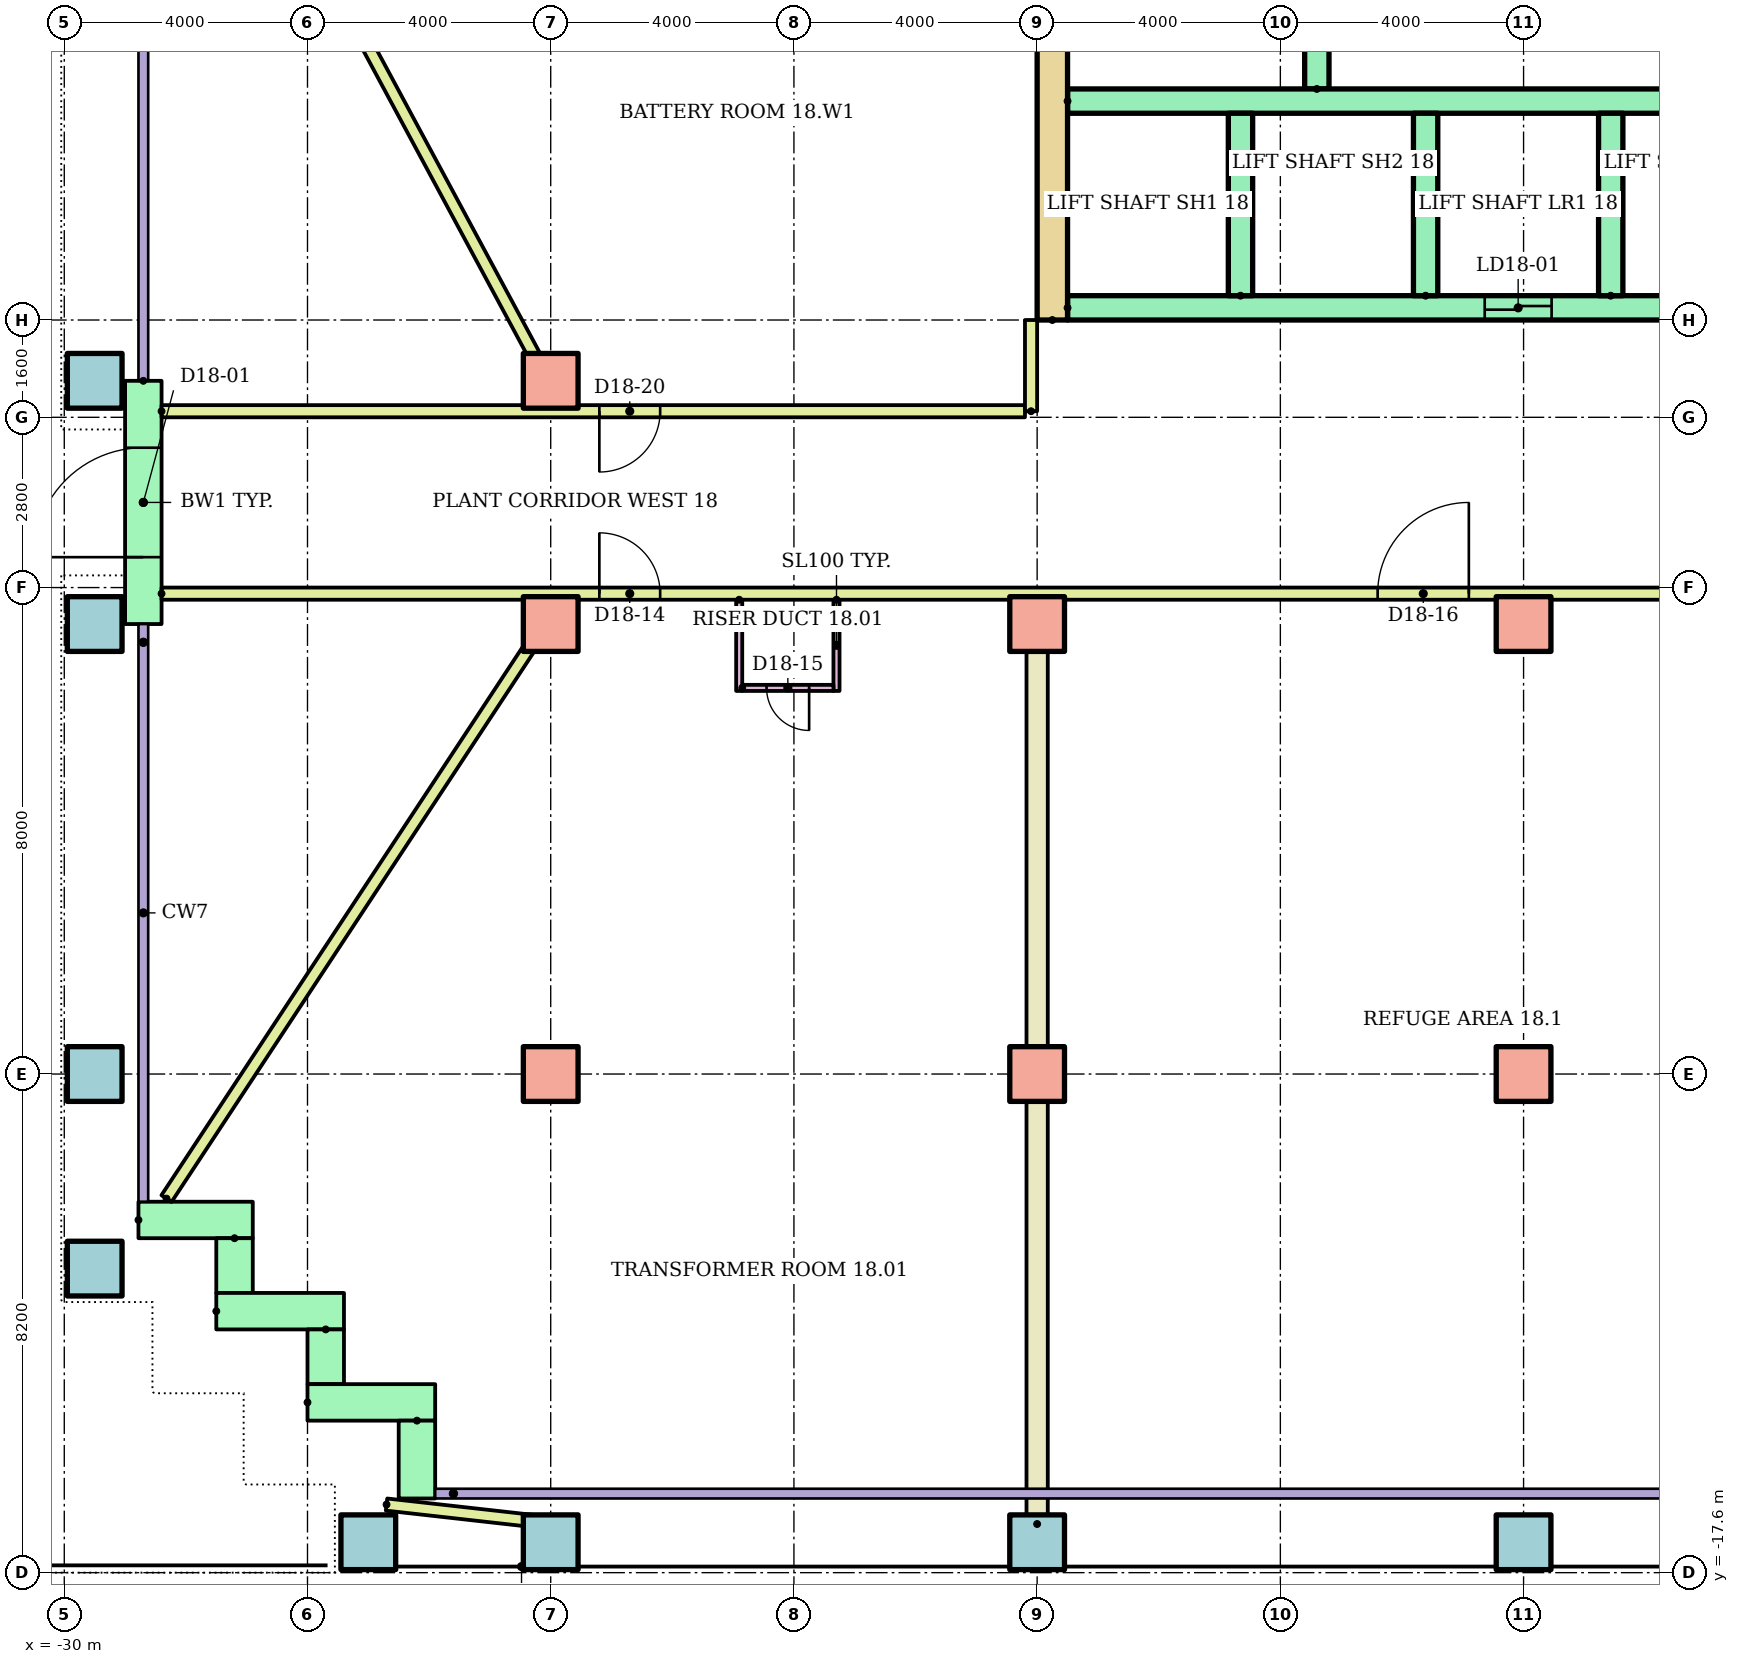
"""IFC4 building model, lengths in metres.
Left out: names, types, materials, properties, quantities, classifications, styles, units other than length and angle.
Written with IfcOpenShell. Run it as: python <this file> out.ifc"""

import sys

from ifc_helpers import new_model, si_unit, direction, frame, frame_2d, origin, origin_2d, place, context, subcontext, project, spatial, rectangle, hollow_rectangle, extrude, element, fill, save


model = new_model("IFC4")
c1 = context("Model", 3, precision=1e-05, world=origin(), true_north=direction((0.0, 1.0)))
c2 = subcontext(c1, "Body", "Model", "MODEL_VIEW")
j1 = project(units=[si_unit("LENGTHUNIT", "METRE"), si_unit("PLANEANGLEUNIT", "RADIAN")], contexts=[c1])
p1 = place(None, origin())
s1 = spatial("IfcSite", under=j1, at=p1, CompositionType="ELEMENT")
p2 = place(p1, origin())
s2 = spatial("IfcBuilding", under=s1, at=p2, CompositionType="ELEMENT")
p3 = place(p2, frame((0.0, 0.0, 73.6)))
s3 = spatial("IfcBuildingStorey", under=s2, at=p3, CompositionType="ELEMENT", Elevation=73.6)
for number, where in (
    (1, (-25.0, -17.1, 0.0)),
    (2, (-22.0, -17.1, 0.0)),
    (3, (-14.0, -17.1, 0.0)),
    (4, (-6.0, -17.1, 0.0)),
    (5, (-29.5, -12.6, 0.0)),
    (6, (-29.5, -9.4, 0.0)),
):
    element("IfcColumn", number, at=place(p3, frame(where)), inside=s3, PredefinedType="COLUMN", context=c2, shape_type="SweptSolid", body=[
        extrude(hollow_rectangle(XDim=0.9, YDim=0.9, WallThickness=0.045, at=origin_2d()), origin(), (0.0, 0.0, 1.0), 3.9),
    ])
for number, where in (
    (7, (-22.0, -9.4, 0.0)),
    (8, (-14.0, -9.4, 0.0)),
    (9, (-6.0, -9.4, 0.0)),
):
    element("IfcColumn", number, at=place(p3, frame(where)), inside=s3, PredefinedType="COLUMN", context=c2, shape_type="SweptSolid", body=[
        extrude(rectangle(XDim=0.9, YDim=0.9, at=origin_2d()), origin(), (0.0, 0.0, 1.0), 3.9),
    ])
p4 = place(p3, frame((-29.5, -2.0, 0.0)))
e10 = element("IfcColumn", 10, at=p4, inside=s3, PredefinedType="COLUMN", context=c2, shape_type="SweptSolid", body=[
    extrude(hollow_rectangle(XDim=0.9, YDim=0.9, WallThickness=0.045, at=origin_2d()), origin(), (0.0, 0.0, 1.0), 3.9),
])
for number, where in (
    (11, (-22.0, -2.0, 0.0)),
    (12, (-14.0, -2.0, 0.0)),
    (13, (-6.0, -2.0, 0.0)),
):
    element("IfcColumn", number, at=place(p3, frame(where)), inside=s3, PredefinedType="COLUMN", context=c2, shape_type="SweptSolid", body=[
        extrude(rectangle(XDim=0.9, YDim=0.9, at=origin_2d()), origin(), (0.0, 0.0, 1.0), 3.9),
    ])
p5 = place(p3, frame((-29.5, 2.0, 0.0)))
e14 = element("IfcColumn", 14, at=p5, inside=s3, PredefinedType="COLUMN", context=c2, shape_type="SweptSolid", body=[
    extrude(hollow_rectangle(XDim=0.9, YDim=0.9, WallThickness=0.045, at=origin_2d()), origin(), (0.0, 0.0, 1.0), 3.9),
])
p6 = place(p3, frame((-22.0, 2.0, 0.0)))
e15 = element("IfcColumn", 15, at=p6, inside=s3, PredefinedType="COLUMN", context=c2, shape_type="SweptSolid", body=[
    extrude(rectangle(XDim=0.9, YDim=0.9, at=origin_2d()), origin(), (0.0, 0.0, 1.0), 3.9),
])
p7 = place(p3, frame((-28.7, 2.0, 0.0), z_axis=(0.0, 0.0, 1.0), x_axis=(0.0, -1.0, 0.0)))
e16 = element("IfcWall", 16, at=p7, inside=s3, PredefinedType="STANDARD", context=c2, shape_type="SweptSolid", body=[
    extrude(rectangle(XDim=4.0, YDim=0.6, at=frame_2d((2.0, 0.0))), origin(), (0.0, 0.0, 1.0), 3.62),
])
p8 = place(p7, frame((1.1, 0.0, 0.0)))
e17 = element("IfcOpeningElement", 17, at=p8, cuts=e16, PredefinedType="OPENING", context=c2, shape_type="SweptSolid", body=[
    extrude(rectangle(XDim=1.8, YDim=2.1, at=frame_2d((0.9, 1.05))), frame((0.0, 0.31, 0.0), z_axis=(0.0, -1.0, 0.0), x_axis=(1.0, 0.0, 0.0)), (0.0, 0.0, 1.0), 0.62),
])
p9 = place(p3, frame((-28.78, -11.8, 0.0)))
e18 = element("IfcWall", 18, at=p9, inside=s3, PredefinedType="STANDARD", context=c2, shape_type="SweptSolid", body=[
    extrude(rectangle(XDim=1.88, YDim=0.6, at=frame_2d((0.94, 0.0))), origin(), (0.0, 0.0, 1.0), 3.62),
])
p10 = place(p3, frame((-27.2, -12.1, 0.0), z_axis=(0.0, 0.0, 1.0), x_axis=(0.0, -1.0, 0.0)))
e19 = element("IfcWall", 19, at=p10, inside=s3, PredefinedType="STANDARD", context=c2, shape_type="SweptSolid", body=[
    extrude(rectangle(XDim=0.9, YDim=0.6, at=frame_2d((0.45, 0.0))), origin(), (0.0, 0.0, 1.0), 3.62),
])
p11 = place(p3, frame((-27.5, -13.3, 0.0)))
e20 = element("IfcWall", 20, at=p11, inside=s3, PredefinedType="STANDARD", context=c2, shape_type="SweptSolid", body=[
    extrude(rectangle(XDim=2.1, YDim=0.6, at=frame_2d((1.05, 0.0))), origin(), (0.0, 0.0, 1.0), 3.62),
])
p12 = place(p3, frame((-25.7, -13.6, 0.0), z_axis=(0.0, 0.0, 1.0), x_axis=(0.0, -1.0, 0.0)))
e21 = element("IfcWall", 21, at=p12, inside=s3, PredefinedType="STANDARD", context=c2, shape_type="SweptSolid", body=[
    extrude(rectangle(XDim=0.9, YDim=0.6, at=frame_2d((0.45, 0.0))), origin(), (0.0, 0.0, 1.0), 3.62),
])
p13 = place(p3, frame((-26.0, -14.8, 0.0)))
e22 = element("IfcWall", 22, at=p13, inside=s3, PredefinedType="STANDARD", context=c2, shape_type="SweptSolid", body=[
    extrude(rectangle(XDim=2.1, YDim=0.6, at=frame_2d((1.05, 0.0))), origin(), (0.0, 0.0, 1.0), 3.62),
])
p14 = place(p3, frame((-24.2, -15.1, 0.0), z_axis=(0.0, 0.0, 1.0), x_axis=(0.0, -1.0, 0.0)))
e23 = element("IfcWall", 23, at=p14, inside=s3, PredefinedType="STANDARD", context=c2, shape_type="SweptSolid", body=[
    extrude(rectangle(XDim=1.28, YDim=0.6, at=frame_2d((0.64, 0.0))), origin(), (0.0, 0.0, 1.0), 3.62),
])
p15 = place(p3, frame((-13.75, 3.0, 0.0), z_axis=(0.0, 0.0, 1.0), x_axis=(0.0, 1.0, 0.0)))
e24 = element("IfcWall", 24, at=p15, inside=s3, PredefinedType="SHEAR", context=c2, shape_type="SweptSolid", body=[
    extrude(rectangle(XDim=17.0, YDim=0.5, at=frame_2d((8.5, 0.0))), origin(), (0.0, 0.0, 1.0), 3.62),
])
p16 = place(p3, frame((-9.4, 6.8, 0.0), z_axis=(0.0, 0.0, 1.0), x_axis=(0.0, 1.0, 0.0)))
e25 = element("IfcWall", 25, at=p16, inside=s3, PredefinedType="SHEAR", context=c2, shape_type="SweptSolid", body=[
    extrude(rectangle(XDim=12.7, YDim=0.4, at=frame_2d((6.35, 0.0))), origin(), (0.0, 0.0, 1.0), 3.62),
])
p17 = place(p16, frame((1.15, 0.0, 0.0)))
e26 = element("IfcOpeningElement", 26, at=p17, cuts=e25, PredefinedType="OPENING", context=c2, shape_type="SweptSolid", body=[
    extrude(rectangle(XDim=1.0, YDim=2.1, at=frame_2d((0.5, 1.05))), frame((0.0, 0.21, 0.0), z_axis=(0.0, -1.0, 0.0), x_axis=(1.0, 0.0, 0.0)), (0.0, 0.0, 1.0), 0.42),
])
p18 = place(p16, frame((7.925, 0.0, 0.0)))
e27 = element("IfcOpeningElement", 27, at=p18, cuts=e25, PredefinedType="OPENING", context=c2, shape_type="SweptSolid", body=[
    extrude(rectangle(XDim=1.0, YDim=2.1, at=frame_2d((0.5, 1.05))), frame((0.0, 0.21, 0.0), z_axis=(0.0, -1.0, 0.0), x_axis=(1.0, 0.0, 0.0)), (0.0, 0.0, 1.0), 0.42),
])
p19 = place(p3, frame((-13.5, 3.2, 0.0)))
e28 = element("IfcWall", 28, at=p19, inside=s3, PredefinedType="SHEAR", context=c2, shape_type="SweptSolid", body=[
    extrude(rectangle(XDim=27.0, YDim=0.4, at=frame_2d((13.5, 0.0))), origin(), (0.0, 0.0, 1.0), 3.62),
])
p20 = place(p19, frame((6.861, 0.0, 0.0)))
e29 = element("IfcOpeningElement", 29, at=p20, cuts=e28, PredefinedType="OPENING", context=c2, shape_type="SweptSolid", body=[
    extrude(rectangle(XDim=1.1, YDim=2.1, at=frame_2d((0.55, 1.05))), frame((0.0, 0.21, 0.0), z_axis=(0.0, -1.0, 0.0), x_axis=(1.0, 0.0, 0.0)), (0.0, 0.0, 1.0), 0.42),
])
p21 = place(p19, frame((9.906, 0.0, 0.0)))
e30 = element("IfcOpeningElement", 30, at=p21, cuts=e28, PredefinedType="OPENING", context=c2, shape_type="SweptSolid", body=[
    extrude(rectangle(XDim=1.1, YDim=2.1, at=frame_2d((0.55, 1.05))), frame((0.0, 0.21, 0.0), z_axis=(0.0, -1.0, 0.0), x_axis=(1.0, 0.0, 0.0)), (0.0, 0.0, 1.0), 0.42),
])
p22 = place(p19, frame((15.994, 0.0, 0.0)))
e31 = element("IfcOpeningElement", 31, at=p22, cuts=e28, PredefinedType="OPENING", context=c2, shape_type="SweptSolid", body=[
    extrude(rectangle(XDim=1.1, YDim=2.1, at=frame_2d((0.55, 1.05))), frame((0.0, 0.21, 0.0), z_axis=(0.0, -1.0, 0.0), x_axis=(1.0, 0.0, 0.0)), (0.0, 0.0, 1.0), 0.42),
])
p23 = place(p19, frame((19.039, 0.0, 0.0)))
e32 = element("IfcOpeningElement", 32, at=p23, cuts=e28, PredefinedType="OPENING", context=c2, shape_type="SweptSolid", body=[
    extrude(rectangle(XDim=1.1, YDim=2.1, at=frame_2d((0.55, 1.05))), frame((0.0, 0.21, 0.0), z_axis=(0.0, -1.0, 0.0), x_axis=(1.0, 0.0, 0.0)), (0.0, 0.0, 1.0), 0.42),
])
p24 = place(p19, frame((12.6, 0.0, 0.0)))
e33 = element("IfcOpeningElement", 33, at=p24, cuts=e28, PredefinedType="OPENING", context=c2, shape_type="SweptSolid", body=[
    extrude(rectangle(XDim=1.8, YDim=2.1, at=frame_2d((0.9, 1.05))), frame((0.0, 0.21, 0.0), z_axis=(0.0, -1.0, 0.0), x_axis=(1.0, 0.0, 0.0)), (0.0, 0.0, 1.0), 0.42),
])
p25 = place(p3, frame((-13.5, 6.6, 0.0)))
e34 = element("IfcWall", 34, at=p25, inside=s3, PredefinedType="SHEAR", context=c2, shape_type="SweptSolid", body=[
    extrude(rectangle(XDim=11.978, YDim=0.4, at=frame_2d((5.989, 0.0))), origin(), (0.0, 0.0, 1.0), 3.62),
])
for number, where, z_axis, x_axis in (
    (35, (-10.656, 3.4, 0.0), (0.0, 0.0, 1.0), (0.0, 1.0, 0.0)),
    (36, (-7.611, 3.4, 0.0), (0.0, 0.0, 1.0), (0.0, 1.0, 0.0)),
    (37, (-4.567, 3.4, 0.0), (0.0, 0.0, 1.0), (0.0, 1.0, 0.0)),
):
    element("IfcWall", number, at=place(p3, frame(where, z_axis=z_axis, x_axis=x_axis)), inside=s3, PredefinedType="SHEAR", context=c2, shape_type="SweptSolid", body=[
        extrude(rectangle(XDim=3.0, YDim=0.4, at=frame_2d((1.5, 0.0))), origin(), (0.0, 0.0, 1.0), 3.62),
    ])
p26 = place(p3, frame((-28.4, -1.5, 0.0)))
e38 = element("IfcWall", 38, at=p26, inside=s3, PredefinedType="PARTITIONING", context=c2, shape_type="SweptSolid", body=[
    extrude(rectangle(XDim=69.6, YDim=0.2, at=frame_2d((34.8, 0.0))), origin(), (0.0, 0.0, 1.0), 3.62),
])
p27 = place(p26, frame((7.2, 0.0, 0.0)))
e39 = element("IfcOpeningElement", 39, at=p27, cuts=e38, PredefinedType="OPENING", context=c2, shape_type="SweptSolid", body=[
    extrude(rectangle(XDim=1.0, YDim=2.4, at=frame_2d((0.5, 1.2))), frame((0.0, 0.11, 0.0), z_axis=(0.0, -1.0, 0.0), x_axis=(1.0, 0.0, 0.0)), (0.0, 0.0, 1.0), 0.22),
])
p28 = place(p26, frame((20.0, 0.0, 0.0)))
e40 = element("IfcOpeningElement", 40, at=p28, cuts=e38, PredefinedType="OPENING", context=c2, shape_type="SweptSolid", body=[
    extrude(rectangle(XDim=1.5, YDim=2.1, at=frame_2d((0.75, 1.05))), frame((0.0, 0.11, 0.0), z_axis=(0.0, -1.0, 0.0), x_axis=(1.0, 0.0, 0.0)), (0.0, 0.0, 1.0), 0.22),
])
p29 = place(p26, frame((34.6, 0.0, 0.0)))
e41 = element("IfcOpeningElement", 41, at=p29, cuts=e38, PredefinedType="OPENING", context=c2, shape_type="SweptSolid", body=[
    extrude(rectangle(XDim=1.5, YDim=2.1, at=frame_2d((0.75, 1.05))), frame((0.0, 0.11, 0.0), z_axis=(0.0, -1.0, 0.0), x_axis=(1.0, 0.0, 0.0)), (0.0, 0.0, 1.0), 0.22),
])
p30 = place(p26, frame((49.6, 0.0, 0.0)))
e42 = element("IfcOpeningElement", 42, at=p30, cuts=e38, PredefinedType="OPENING", context=c2, shape_type="SweptSolid", body=[
    extrude(rectangle(XDim=1.6, YDim=2.4, at=frame_2d((0.8, 1.2))), frame((0.0, 0.11, 0.0), z_axis=(0.0, -1.0, 0.0), x_axis=(1.0, 0.0, 0.0)), (0.0, 0.0, 1.0), 0.22),
])
p31 = place(p26, frame((63.2, 0.0, 0.0)))
e43 = element("IfcOpeningElement", 43, at=p31, cuts=e38, PredefinedType="OPENING", context=c2, shape_type="SweptSolid", body=[
    extrude(rectangle(XDim=1.6, YDim=2.4, at=frame_2d((0.8, 1.2))), frame((0.0, 0.11, 0.0), z_axis=(0.0, -1.0, 0.0), x_axis=(1.0, 0.0, 0.0)), (0.0, 0.0, 1.0), 0.22),
])
p32 = place(p3, frame((-28.4, 1.5, 0.0)))
e44 = element("IfcWall", 44, at=p32, inside=s3, PredefinedType="PARTITIONING", context=c2, shape_type="SweptSolid", body=[
    extrude(rectangle(XDim=14.2, YDim=0.2, at=frame_2d((7.1, 0.0))), origin(), (0.0, 0.0, 1.0), 3.62),
])
p33 = place(p32, frame((7.2, 0.0, 0.0)))
e45 = element("IfcOpeningElement", 45, at=p33, cuts=e44, PredefinedType="OPENING", context=c2, shape_type="SweptSolid", body=[
    extrude(rectangle(XDim=1.0, YDim=2.4, at=frame_2d((0.5, 1.2))), frame((0.0, 0.11, 0.0), z_axis=(0.0, -1.0, 0.0), x_axis=(1.0, 0.0, 0.0)), (0.0, 0.0, 1.0), 0.22),
])
p34 = place(p3, frame((-14.1, 1.5, 0.0), z_axis=(0.0, 0.0, 1.0), x_axis=(0.0, 1.0, 0.0)))
e46 = element("IfcWall", 46, at=p34, inside=s3, PredefinedType="PARTITIONING", context=c2, shape_type="SweptSolid", body=[
    extrude(rectangle(XDim=1.5, YDim=0.2, at=frame_2d((0.75, 0.0))), origin(), (0.0, 0.0, 1.0), 3.62),
])
for number, where, z_axis, x_axis in (
    (47, (-18.9, -1.6, 0.0), (0.0, 0.0, 1.0), (0.0, -1.0, 0.0)),
    (48, (-17.3, -1.6, 0.0), (0.0, 0.0, 1.0), (0.0, -1.0, 0.0)),
):
    element("IfcWall", number, at=place(p3, frame(where, z_axis=z_axis, x_axis=x_axis)), inside=s3, PredefinedType="PARTITIONING", context=c2, shape_type="SweptSolid", body=[
        extrude(rectangle(XDim=1.5, YDim=0.1, at=frame_2d((0.75, 0.0))), origin(), (0.0, 0.0, 1.0), 3.62),
    ])
p35 = place(p3, frame((-18.85, -3.05, 0.0)))
e49 = element("IfcWall", 49, at=p35, inside=s3, PredefinedType="PARTITIONING", context=c2, shape_type="SweptSolid", body=[
    extrude(rectangle(XDim=1.5, YDim=0.1, at=frame_2d((0.75, 0.0))), origin(), (0.0, 0.0, 1.0), 3.62),
])
p36 = place(p35, frame((0.4, 0.0, 0.0)))
e50 = element("IfcOpeningElement", 50, at=p36, cuts=e49, PredefinedType="OPENING", context=c2, shape_type="SweptSolid", body=[
    extrude(rectangle(XDim=0.7, YDim=2.0, at=frame_2d((0.35, 1.0))), frame((0.0, 0.06, 0.0), z_axis=(0.0, -1.0, 0.0), x_axis=(1.0, 0.0, 0.0)), (0.0, 0.0, 1.0), 0.12),
])
p37 = place(p3, frame((-24.7, -16.48, 0.0), z_axis=(0.0, 0.0, 1.0), x_axis=(0.99375222394, -0.111608769432, 0.0)))
e51 = element("IfcWall", 51, at=p37, inside=s3, PredefinedType="PARTITIONING", context=c2, shape_type="SweptSolid", body=[
    extrude(rectangle(XDim=2.868, YDim=0.2, at=frame_2d((1.434, 0.0))), origin(), (0.0, 0.0, 1.0), 3.62),
])
p38 = place(p3, frame((-28.319, -11.448, 0.0), z_axis=(0.0, 0.0, 1.0), x_axis=(0.550193026391, 0.835037504374, 0.0)))
e52 = element("IfcWall", 52, at=p38, inside=s3, PredefinedType="PARTITIONING", context=c2, shape_type="SweptSolid", body=[
    extrude(rectangle(XDim=11.734, YDim=0.2, at=frame_2d((5.867, 0.0))), origin(), (0.0, 0.0, 1.0), 3.62),
])
p39 = place(p3, frame((-14.0, -16.8, 0.0), z_axis=(0.0, 0.0, 1.0), x_axis=(0.0, 1.0, 0.0)))
e53 = element("IfcWall", 53, at=p39, inside=s3, PredefinedType="PARTITIONING", context=c2, shape_type="SweptSolid", body=[
    extrude(rectangle(XDim=15.2, YDim=0.35, at=frame_2d((7.6, 0.0))), origin(), (0.0, 0.0, 1.0), 3.62),
])
p40 = place(p3, frame((-28.425, 13.854, 0.0), z_axis=(0.0, 0.0, 1.0), x_axis=(0.473900322789, -0.88057849398, 0.0)))
e54 = element("IfcWall", 54, at=p40, inside=s3, PredefinedType="PARTITIONING", context=c2, shape_type="SweptSolid", body=[
    extrude(rectangle(XDim=13.866, YDim=0.2, at=frame_2d((6.933, 0.0))), origin(), (0.0, 0.0, 1.0), 3.62),
])
p41 = place(p8, frame((1.8, 0.0, 0.0), z_axis=(0.0, 0.0, 1.0), x_axis=(-1.0, 0.0, 0.0)))
e55 = element("IfcDoor", 55, at=p41, inside=s3, OperationType="DOUBLE_DOOR_SINGLE_SWING", PredefinedType="DOOR", context=c2, shape_type="SweptSolid", body=[
    extrude(rectangle(XDim=1.8, YDim=2.1, at=frame_2d((0.9, 1.05))), frame((0.0, 0.025, 0.0), z_axis=(0.0, -1.0, 0.0), x_axis=(1.0, 0.0, 0.0)), (0.0, 0.0, 1.0), 0.05),
])
fill(e17, e55)
p42 = place(p20, origin())
e56 = element("IfcDoor", 56, at=p42, inside=s3, OperationType="SLIDING_TO_LEFT", PredefinedType="DOOR", context=c2, shape_type="SweptSolid", body=[
    extrude(rectangle(XDim=1.1, YDim=2.1, at=frame_2d((0.55, 1.05))), frame((0.0, 0.025, 0.0), z_axis=(0.0, -1.0, 0.0), x_axis=(1.0, 0.0, 0.0)), (0.0, 0.0, 1.0), 0.05),
])
fill(e29, e56)
p43 = place(p27, origin())
e57 = element("IfcDoor", 57, at=p43, inside=s3, OperationType="SINGLE_SWING_LEFT", PredefinedType="DOOR", context=c2, shape_type="SweptSolid", body=[
    extrude(rectangle(XDim=1.0, YDim=2.4, at=frame_2d((0.5, 1.2))), frame((0.0, 0.025, 0.0), z_axis=(0.0, -1.0, 0.0), x_axis=(1.0, 0.0, 0.0)), (0.0, 0.0, 1.0), 0.05),
])
fill(e39, e57)
p44 = place(p36, frame((0.7, 0.0, 0.0), z_axis=(0.0, 0.0, 1.0), x_axis=(-1.0, 0.0, 0.0)))
e58 = element("IfcDoor", 58, at=p44, inside=s3, OperationType="SINGLE_SWING_RIGHT", PredefinedType="DOOR", context=c2, shape_type="SweptSolid", body=[
    extrude(rectangle(XDim=0.7, YDim=2.0, at=frame_2d((0.35, 1.0))), frame((0.0, 0.025, 0.0), z_axis=(0.0, -1.0, 0.0), x_axis=(1.0, 0.0, 0.0)), (0.0, 0.0, 1.0), 0.05),
])
fill(e50, e58)
p45 = place(p28, origin())
e59 = element("IfcDoor", 59, at=p45, inside=s3, OperationType="DOUBLE_DOOR_SINGLE_SWING", PredefinedType="DOOR", context=c2, shape_type="SweptSolid", body=[
    extrude(rectangle(XDim=1.5, YDim=2.1, at=frame_2d((0.75, 1.05))), frame((0.0, 0.025, 0.0), z_axis=(0.0, -1.0, 0.0), x_axis=(1.0, 0.0, 0.0)), (0.0, 0.0, 1.0), 0.05),
])
fill(e40, e59)
p46 = place(p33, frame((1.0, 0.0, 0.0), z_axis=(0.0, 0.0, 1.0), x_axis=(-1.0, 0.0, 0.0)))
e60 = element("IfcDoor", 60, at=p46, inside=s3, OperationType="SINGLE_SWING_LEFT", PredefinedType="DOOR", context=c2, shape_type="SweptSolid", body=[
    extrude(rectangle(XDim=1.0, YDim=2.4, at=frame_2d((0.5, 1.2))), frame((0.0, 0.025, 0.0), z_axis=(0.0, -1.0, 0.0), x_axis=(1.0, 0.0, 0.0)), (0.0, 0.0, 1.0), 0.05),
])
fill(e45, e60)
save(model, sys.argv[1])
